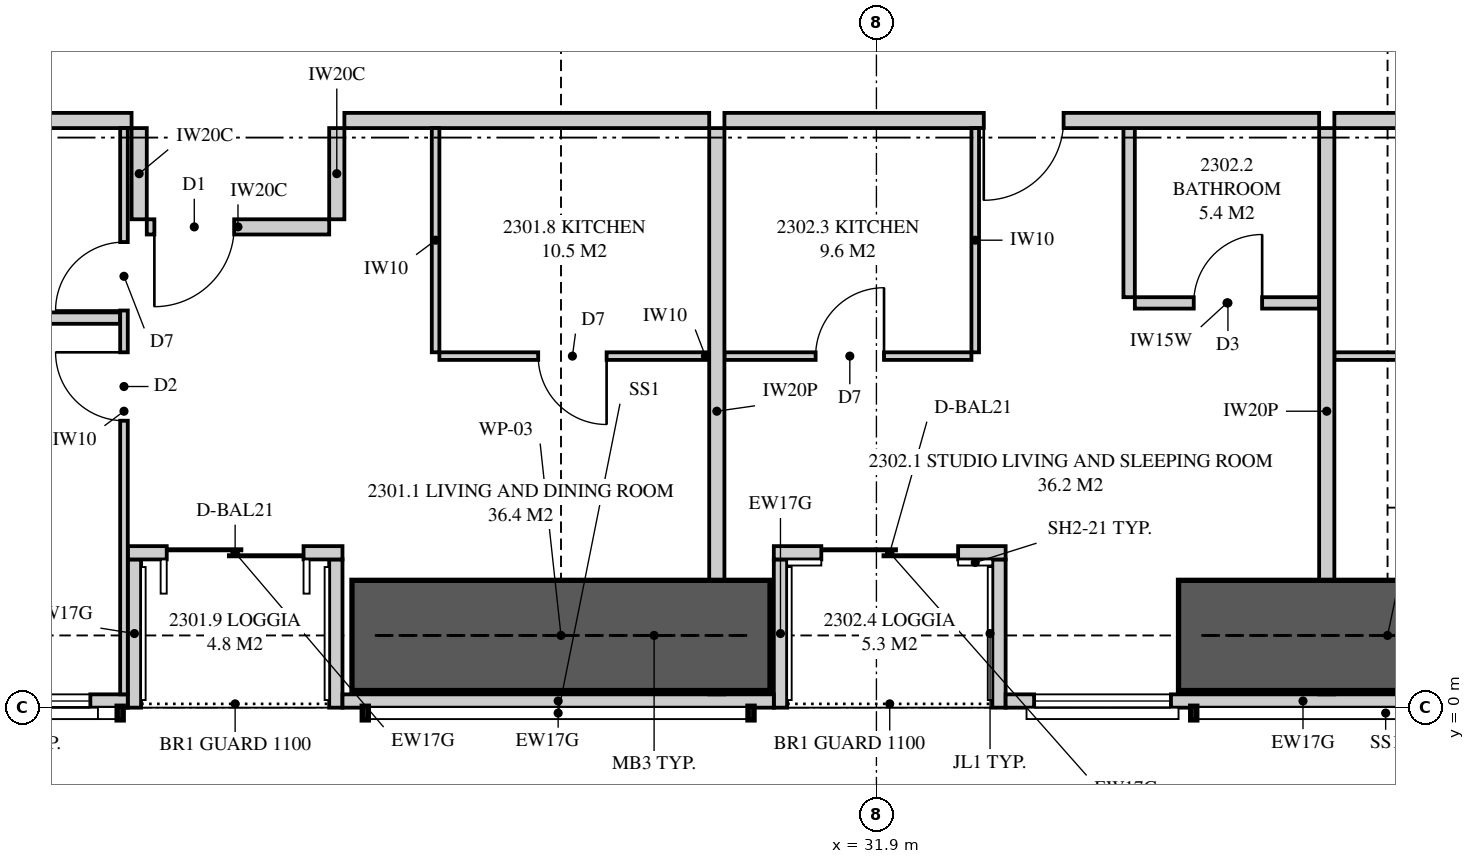
"""IFC4 building model, lengths in metres.
Left out: names, types, materials, properties, quantities, classifications, styles, units other than length and angle.
Written with IfcOpenShell. Run it as: python <this file> out.ifc"""

import sys

from ifc_helpers import new_model, si_unit, direction, frame, frame_2d, origin, place, context, subcontext, project, spatial, polyline, rectangle, outline, extrude, element, fill, save


model = new_model("IFC4")
c1 = context("Model", 3, precision=1e-05, world=origin(), true_north=direction((0.0, 1.0)))
c2 = subcontext(c1, "Body", "Model", "MODEL_VIEW")
j1 = project(units=[si_unit("LENGTHUNIT", "METRE"), si_unit("PLANEANGLEUNIT", "RADIAN")], contexts=[c1])
p1 = place(None, origin())
s1 = spatial("IfcSite", under=j1, at=p1, CompositionType="ELEMENT")
p2 = place(p1, origin())
s2 = spatial("IfcBuilding", under=s1, at=p2, CompositionType="ELEMENT")
p3 = place(p2, frame((0.0, 0.0, 88.1)))
s3 = spatial("IfcBuildingStorey", under=s2, at=p3, CompositionType="ELEMENT", Elevation=88.1)
p4 = place(p3, frame((9.051, 0.087, 0.0), z_axis=(0.0, 0.0, 1.0), x_axis=(1.0, 0.0, 0.0)))
e1 = element("IfcWall", 1, at=p4, inside=s3, PredefinedType="SOLIDWALL", context=c2, shape_type="SweptSolid", body=[
    extrude(outline(polyline([(0.0, 0.0), (12.999, 0.0), (12.999, 2.15), (7.824, 2.15), (7.824, 3.11), (7.666, 3.11), (7.666, 2.15), (7.62, 2.15), (7.62, 3.11), (0.0, 3.11), (0.0, 0.0)])), frame((0.0, 0.087, 0.0), z_axis=(0.0, -1.0, 0.0), x_axis=(1.0, 0.0, 0.0)), (0.0, 0.0, 1.0), 0.175),
])
p5 = place(p4, frame((3.134, 0.0, 0.4)))
e2 = element("IfcOpeningElement", 2, at=p5, cuts=e1, PredefinedType="OPENING", context=c2, shape_type="SweptSolid", body=[
    extrude(rectangle(XDim=1.8, YDim=1.7, at=frame_2d((0.9, 0.85))), frame((0.0, 0.097, 0.0), z_axis=(0.0, -1.0, 0.0), x_axis=(1.0, 0.0, 0.0)), (0.0, 0.0, 1.0), 0.195),
])
p6 = place(p4, frame((10.706, 0.0, 0.4)))
e3 = element("IfcOpeningElement", 3, at=p6, cuts=e1, PredefinedType="OPENING", context=c2, shape_type="SweptSolid", body=[
    extrude(rectangle(XDim=1.8, YDim=1.7, at=frame_2d((0.9, 0.85))), frame((0.0, 0.097, 0.0), z_axis=(0.0, -1.0, 0.0), x_axis=(1.0, 0.0, 0.0)), (0.0, 0.0, 1.0), 0.195),
])
p7 = place(p3, frame((24.875, 0.087, 0.0), z_axis=(0.0, 0.0, 1.0), x_axis=(1.0, 0.0, 0.0)))
e4 = element("IfcWall", 4, at=p7, inside=s3, PredefinedType="SOLIDWALL", context=c2, shape_type="SweptSolid", body=[
    extrude(rectangle(XDim=5.675, YDim=0.175, at=frame_2d((2.837, 0.0))), origin(), (0.0, 0.0, 1.0), 2.15),
])
p8 = place(p3, frame((33.6, 0.087, 0.0), z_axis=(0.0, 0.0, 1.0), x_axis=(1.0, 0.0, 0.0)))
e5 = element("IfcWall", 5, at=p8, inside=s3, PredefinedType="SOLIDWALL", context=c2, shape_type="SweptSolid", body=[
    extrude(outline(polyline([(0.0, 0.0), (7.825, 0.0), (7.825, 3.11), (5.228, 3.11), (5.228, 2.15), (5.183, 2.15), (5.183, 3.11), (5.025, 3.11), (5.025, 2.15), (0.0, 2.15), (0.0, 0.0)])), frame((0.0, 0.087, 0.0), z_axis=(0.0, -1.0, 0.0), x_axis=(1.0, 0.0, 0.0)), (0.0, 0.0, 1.0), 0.175),
])
p9 = place(p8, frame((0.375, 0.0, 0.4)))
e6 = element("IfcOpeningElement", 6, at=p9, cuts=e5, PredefinedType="OPENING", context=c2, shape_type="SweptSolid", body=[
    extrude(rectangle(XDim=1.8, YDim=1.7, at=frame_2d((0.9, 0.85))), frame((0.0, 0.097, 0.0), z_axis=(0.0, -1.0, 0.0), x_axis=(1.0, 0.0, 0.0)), (0.0, 0.0, 1.0), 0.195),
])
p10 = place(p3, frame((22.05, 2.038, 0.0), z_axis=(0.0, 0.0, 1.0), x_axis=(1.0, 0.0, 0.0)))
e7 = element("IfcWall", 7, at=p10, inside=s3, PredefinedType="SOLIDWALL", context=c2, shape_type="SweptSolid", body=[
    extrude(rectangle(XDim=2.825, YDim=0.175, at=frame_2d((1.413, 0.0))), origin(), (0.0, 0.0, 1.0), 3.11),
])
p11 = place(p10, frame((0.512, 0.0, 0.0)))
e8 = element("IfcOpeningElement", 8, at=p11, cuts=e7, PredefinedType="OPENING", context=c2, shape_type="SweptSolid", body=[
    extrude(rectangle(XDim=1.8, YDim=2.1, at=frame_2d((0.9, 1.05))), frame((0.0, 0.097, 0.0), z_axis=(0.0, -1.0, 0.0), x_axis=(1.0, 0.0, 0.0)), (0.0, 0.0, 1.0), 0.195),
])
for number, where, z_axis, x_axis in (
    (9, (22.137, 0.0, 0.0), (0.0, 0.0, 1.0), (0.0, 1.0, 0.0)),
    (10, (24.788, 0.0, 0.0), (0.0, 0.0, 1.0), (0.0, 1.0, 0.0)),
):
    element("IfcWall", number, at=place(p3, frame(where, z_axis=z_axis, x_axis=x_axis)), inside=s3, PredefinedType="SOLIDWALL", context=c2, shape_type="SweptSolid", body=[
        extrude(outline(polyline([(0.0, 0.0), (1.95, 0.0), (1.95, 3.11), (1.75, 3.11), (1.75, 2.15), (0.15, 2.15), (0.15, 3.11), (0.0, 3.11), (0.0, 0.0)])), frame((0.0, 0.087, 0.0), z_axis=(0.0, -1.0, 0.0), x_axis=(1.0, 0.0, 0.0)), (0.0, 0.0, 1.0), 0.175),
    ])
p12 = place(p3, frame((30.55, 2.038, 0.0), z_axis=(0.0, 0.0, 1.0), x_axis=(1.0, 0.0, 0.0)))
e11 = element("IfcWall", 11, at=p12, inside=s3, PredefinedType="SOLIDWALL", context=c2, shape_type="SweptSolid", body=[
    extrude(rectangle(XDim=3.05, YDim=0.175, at=frame_2d((1.525, 0.0))), origin(), (0.0, 0.0, 1.0), 3.11),
])
p13 = place(p12, frame((0.625, 0.0, 0.0)))
e12 = element("IfcOpeningElement", 12, at=p13, cuts=e11, PredefinedType="OPENING", context=c2, shape_type="SweptSolid", body=[
    extrude(rectangle(XDim=1.8, YDim=2.1, at=frame_2d((0.9, 1.05))), frame((0.0, 0.097, 0.0), z_axis=(0.0, -1.0, 0.0), x_axis=(1.0, 0.0, 0.0)), (0.0, 0.0, 1.0), 0.195),
])
for number, where, z_axis, x_axis in (
    (13, (30.637, 0.0, 0.0), (0.0, 0.0, 1.0), (0.0, 1.0, 0.0)),
    (14, (33.512, 0.0, 0.0), (0.0, 0.0, 1.0), (0.0, 1.0, 0.0)),
):
    element("IfcWall", number, at=place(p3, frame(where, z_axis=z_axis, x_axis=x_axis)), inside=s3, PredefinedType="SOLIDWALL", context=c2, shape_type="SweptSolid", body=[
        extrude(outline(polyline([(0.0, 0.0), (1.95, 0.0), (1.95, 3.11), (1.75, 3.11), (1.75, 2.15), (0.15, 2.15), (0.15, 3.11), (0.0, 3.11), (0.0, 0.0)])), frame((0.0, 0.087, 0.0), z_axis=(0.0, -1.0, 0.0), x_axis=(1.0, 0.0, 0.0)), (0.0, 0.0, 1.0), 0.175),
    ])
p14 = place(p3, frame((29.8, 0.175, 0.0), z_axis=(0.0, 0.0, 1.0), x_axis=(0.0, 1.0, 0.0)))
e15 = element("IfcWall", 15, at=p14, inside=s3, PredefinedType="PARTITIONING", context=c2, shape_type="SweptSolid", body=[
    extrude(outline(polyline([(0.526, 2.15), (0.0, 2.15), (0.0, 0.0), (0.526, 0.0), (0.526, 0.115), (1.024, 0.115), (1.024, 0.0), (7.45, 0.0), (7.45, 3.11), (1.685, 3.11), (1.685, 2.15), (1.024, 2.15), (1.024, 2.035), (0.526, 2.035), (0.526, 2.15)])), frame((0.0, 0.1, 0.0), z_axis=(0.0, -1.0, 0.0), x_axis=(1.0, 0.0, 0.0)), (0.0, 0.0, 1.0), 0.2),
])
p15 = place(p3, frame((17.775, 7.725, 0.0), z_axis=(0.0, 0.0, 1.0), x_axis=(1.0, 0.0, 0.0)))
e16 = element("IfcWall", 16, at=p15, inside=s3, PredefinedType="PARTITIONING", context=c2, shape_type="SweptSolid", body=[
    extrude(rectangle(XDim=4.325, YDim=0.2, at=frame_2d((2.163, 0.0))), origin(), (0.0, 0.0, 1.0), 3.11),
])
p16 = place(p3, frame((22.0, 0.175, 0.0), z_axis=(0.0, 0.0, 1.0), x_axis=(0.0, 1.0, 0.0)))
e17 = element("IfcWall", 17, at=p16, inside=s3, PredefinedType="PARTITIONING", context=c2, shape_type="SweptSolid", body=[
    extrude(outline(polyline([(0.0, 0.0), (7.45, 0.0), (7.45, 3.11), (1.635, 3.11), (1.635, 2.15), (0.0, 2.15), (0.0, 3.11), (0.0, 0.0)])), frame((0.0, 0.05, 0.0), z_axis=(0.0, -1.0, 0.0), x_axis=(1.0, 0.0, 0.0)), (0.0, 0.0, 1.0), 0.1),
])
p17 = place(p16, frame((3.6, 0.0, 0.0)))
e18 = element("IfcOpeningElement", 18, at=p17, cuts=e17, PredefinedType="OPENING", context=c2, shape_type="SweptSolid", body=[
    extrude(rectangle(XDim=0.9, YDim=2.1, at=frame_2d((0.45, 1.05))), frame((0.0, 0.06, 0.0), z_axis=(0.0, -1.0, 0.0), x_axis=(1.0, 0.0, 0.0)), (0.0, 0.0, 1.0), 0.12),
])
p18 = place(p16, frame((5.05, 0.0, 0.0)))
e19 = element("IfcOpeningElement", 19, at=p18, cuts=e17, PredefinedType="OPENING", context=c2, shape_type="SweptSolid", body=[
    extrude(rectangle(XDim=0.9, YDim=2.1, at=frame_2d((0.45, 1.05))), frame((0.0, 0.06, 0.0), z_axis=(0.0, -1.0, 0.0), x_axis=(1.0, 0.0, 0.0)), (0.0, 0.0, 1.0), 0.12),
])
p19 = place(p3, frame((17.75, 5.125, 0.0), z_axis=(0.0, 0.0, 1.0), x_axis=(1.0, 0.0, 0.0)))
e20 = element("IfcWall", 20, at=p19, inside=s3, PredefinedType="PLUMBINGWALL", context=c2, shape_type="SweptSolid", body=[
    extrude(rectangle(XDim=4.2, YDim=0.15, at=frame_2d((2.1, 0.0))), origin(), (0.0, 0.0, 1.0), 3.11),
])
p20 = place(p3, frame((26.15, 4.625, 0.0), z_axis=(0.0, 0.0, 1.0), x_axis=(1.0, 0.0, 0.0)))
e21 = element("IfcWall", 21, at=p20, inside=s3, PredefinedType="PARTITIONING", context=c2, shape_type="SweptSolid", body=[
    extrude(outline(polyline([(0.0, 0.0), (3.55, 0.0), (3.55, 3.11), (1.896, 3.11), (1.896, 2.531), (1.304, 2.531), (1.304, 3.11), (0.0, 3.11), (0.0, 0.0)])), frame((0.0, 0.05, 0.0), z_axis=(0.0, -1.0, 0.0), x_axis=(1.0, 0.0, 0.0)), (0.0, 0.0, 1.0), 0.1),
])
p21 = place(p20, frame((1.3, 0.0, 0.0)))
e22 = element("IfcOpeningElement", 22, at=p21, cuts=e21, PredefinedType="OPENING", context=c2, shape_type="SweptSolid", body=[
    extrude(rectangle(XDim=0.9, YDim=2.1, at=frame_2d((0.45, 1.05))), frame((0.0, 0.06, 0.0), z_axis=(0.0, -1.0, 0.0), x_axis=(1.0, 0.0, 0.0)), (0.0, 0.0, 1.0), 0.12),
])
p22 = place(p3, frame((26.1, 4.675, 0.0), z_axis=(0.0, 0.0, 1.0), x_axis=(0.0, 1.0, 0.0)))
e23 = element("IfcWall", 23, at=p22, inside=s3, PredefinedType="PARTITIONING", context=c2, shape_type="SweptSolid", body=[
    extrude(rectangle(XDim=2.95, YDim=0.1, at=frame_2d((1.475, 0.0))), origin(), (0.0, 0.0, 1.0), 3.11),
])
p23 = place(p3, frame((37.825, 0.175, 0.0), z_axis=(0.0, 0.0, 1.0), x_axis=(0.0, 1.0, 0.0)))
e24 = element("IfcWall", 24, at=p23, inside=s3, PredefinedType="PARTITIONING", context=c2, shape_type="SweptSolid", body=[
    extrude(outline(polyline([(0.526, 2.15), (0.0, 2.15), (0.0, 0.0), (0.526, 0.0), (0.526, 0.969), (1.024, 0.969), (1.024, 0.0), (7.45, 0.0), (7.45, 3.11), (1.685, 3.11), (1.685, 2.15), (1.024, 2.15), (1.024, 1.18), (0.526, 1.18), (0.526, 2.15)])), frame((0.0, 0.1, 0.0), z_axis=(0.0, -1.0, 0.0), x_axis=(1.0, 0.0, 0.0)), (0.0, 0.0, 1.0), 0.2),
])
p24 = place(p3, frame((29.9, 7.725, 0.0), z_axis=(0.0, 0.0, 1.0), x_axis=(1.0, 0.0, 0.0)))
e25 = element("IfcWall", 25, at=p24, inside=s3, PredefinedType="PARTITIONING", context=c2, shape_type="SweptSolid", body=[
    extrude(rectangle(XDim=7.825, YDim=0.2, at=frame_2d((3.913, 0.0))), origin(), (0.0, 0.0, 1.0), 3.11),
])
p25 = place(p24, frame((3.413, 0.0, 0.0)))
e26 = element("IfcOpeningElement", 26, at=p25, cuts=e25, PredefinedType="OPENING", context=c2, shape_type="SweptSolid", body=[
    extrude(rectangle(XDim=1.05, YDim=2.2, at=frame_2d((0.525, 1.1))), frame((0.0, 0.11, 0.0), z_axis=(0.0, -1.0, 0.0), x_axis=(1.0, 0.0, 0.0)), (0.0, 0.0, 1.0), 0.22),
])
p26 = place(p3, frame((35.3, 5.325, 0.0), z_axis=(0.0, 0.0, 1.0), x_axis=(1.0, 0.0, 0.0)))
e27 = element("IfcWall", 27, at=p26, inside=s3, PredefinedType="PLUMBINGWALL", context=c2, shape_type="SweptSolid", body=[
    extrude(rectangle(XDim=2.425, YDim=0.15, at=frame_2d((1.212, 0.0))), origin(), (0.0, 0.0, 1.0), 3.11),
])
p27 = place(p26, frame((0.775, 0.0, 0.0)))
e28 = element("IfcOpeningElement", 28, at=p27, cuts=e27, PredefinedType="OPENING", context=c2, shape_type="SweptSolid", body=[
    extrude(rectangle(XDim=0.9, YDim=2.1, at=frame_2d((0.45, 1.05))), frame((0.0, 0.085, 0.0), z_axis=(0.0, -1.0, 0.0), x_axis=(1.0, 0.0, 0.0)), (0.0, 0.0, 1.0), 0.17),
])
p28 = place(p3, frame((35.225, 5.4, 0.0), z_axis=(0.0, 0.0, 1.0), x_axis=(0.0, 1.0, 0.0)))
e29 = element("IfcWall", 29, at=p28, inside=s3, PredefinedType="PLUMBINGWALL", context=c2, shape_type="SweptSolid", body=[
    extrude(rectangle(XDim=2.225, YDim=0.15, at=frame_2d((1.113, 0.0))), origin(), (0.0, 0.0, 1.0), 3.11),
])
p29 = place(p3, frame((29.9, 4.625, 0.0), z_axis=(0.0, 0.0, 1.0), x_axis=(1.0, 0.0, 0.0)))
e30 = element("IfcWall", 30, at=p29, inside=s3, PredefinedType="PARTITIONING", context=c2, shape_type="SweptSolid", body=[
    extrude(rectangle(XDim=3.25, YDim=0.1, at=frame_2d((1.625, 0.0))), origin(), (0.0, 0.0, 1.0), 3.11),
])
p30 = place(p29, frame((1.2, 0.0, 0.0)))
e31 = element("IfcOpeningElement", 31, at=p30, cuts=e30, PredefinedType="OPENING", context=c2, shape_type="SweptSolid", body=[
    extrude(rectangle(XDim=0.9, YDim=2.1, at=frame_2d((0.45, 1.05))), frame((0.0, 0.06, 0.0), z_axis=(0.0, -1.0, 0.0), x_axis=(1.0, 0.0, 0.0)), (0.0, 0.0, 1.0), 0.12),
])
p31 = place(p3, frame((33.2, 4.675, 0.0), z_axis=(0.0, 0.0, 1.0), x_axis=(0.0, 1.0, 0.0)))
e32 = element("IfcWall", 32, at=p31, inside=s3, PredefinedType="PARTITIONING", context=c2, shape_type="SweptSolid", body=[
    extrude(rectangle(XDim=2.95, YDim=0.1, at=frame_2d((1.475, 0.0))), origin(), (0.0, 0.0, 1.0), 3.11),
])
p32 = place(p3, frame((37.925, 7.725, 0.0), z_axis=(0.0, 0.0, 1.0), x_axis=(1.0, 0.0, 0.0)))
e33 = element("IfcWall", 33, at=p32, inside=s3, PredefinedType="PARTITIONING", context=c2, shape_type="SweptSolid", body=[
    extrude(outline(polyline([(0.0, 0.0), (8.1, 0.0), (8.1, 3.11), (1.046, 3.11), (1.046, 2.531), (0.354, 2.531), (0.354, 3.11), (0.0, 3.11), (0.0, 0.0)])), frame((0.0, 0.1, 0.0), z_axis=(0.0, -1.0, 0.0), x_axis=(1.0, 0.0, 0.0)), (0.0, 0.0, 1.0), 0.2),
])
p33 = place(p32, frame((2.4, 0.0, 0.0)))
e34 = element("IfcOpeningElement", 34, at=p33, cuts=e33, PredefinedType="OPENING", context=c2, shape_type="SweptSolid", body=[
    extrude(rectangle(XDim=1.05, YDim=2.2, at=frame_2d((0.525, 1.1))), frame((0.0, 0.11, 0.0), z_axis=(0.0, -1.0, 0.0), x_axis=(1.0, 0.0, 0.0)), (0.0, 0.0, 1.0), 0.22),
])
p34 = place(p3, frame((37.925, 4.625, 0.0), z_axis=(0.0, 0.0, 1.0), x_axis=(1.0, 0.0, 0.0)))
e35 = element("IfcWall", 35, at=p34, inside=s3, PredefinedType="PARTITIONING", context=c2, shape_type="SweptSolid", body=[
    extrude(outline(polyline([(0.0, 0.0), (3.55, 0.0), (3.55, 3.11), (0.996, 3.11), (0.996, 2.531), (0.404, 2.531), (0.404, 3.11), (0.0, 3.11), (0.0, 0.0)])), frame((0.0, 0.05, 0.0), z_axis=(0.0, -1.0, 0.0), x_axis=(1.0, 0.0, 0.0)), (0.0, 0.0, 1.0), 0.1),
])
p35 = place(p34, frame((1.35, 0.0, 0.0)))
e36 = element("IfcOpeningElement", 36, at=p35, cuts=e35, PredefinedType="OPENING", context=c2, shape_type="SweptSolid", body=[
    extrude(rectangle(XDim=0.9, YDim=2.1, at=frame_2d((0.45, 1.05))), frame((0.0, 0.06, 0.0), z_axis=(0.0, -1.0, 0.0), x_axis=(1.0, 0.0, 0.0)), (0.0, 0.0, 1.0), 0.12),
])
p36 = place(p3, frame((24.9, 7.725, 0.0), z_axis=(0.0, 0.0, 1.0), x_axis=(1.0, 0.0, 0.0)))
e37 = element("IfcWall", 37, at=p36, inside=s3, PredefinedType="PARTITIONING", context=c2, shape_type="SweptSolid", body=[
    extrude(outline(polyline([(0.0, 0.0), (4.8, 0.0), (4.8, 3.11), (3.196, 3.11), (3.196, 2.531), (2.504, 2.531), (2.504, 3.11), (0.0, 3.11), (0.0, 0.0)])), frame((0.0, 0.1, 0.0), z_axis=(0.0, -1.0, 0.0), x_axis=(1.0, 0.0, 0.0)), (0.0, 0.0, 1.0), 0.2),
])
p37 = place(p3, frame((22.3, 6.325, 0.0), z_axis=(0.0, 0.0, 1.0), x_axis=(1.0, 0.0, 0.0)))
e38 = element("IfcWall", 38, at=p37, inside=s3, PredefinedType="PARTITIONING", context=c2, shape_type="SweptSolid", body=[
    extrude(rectangle(XDim=2.4, YDim=0.2, at=frame_2d((1.2, 0.0))), origin(), (0.0, 0.0, 1.0), 3.11),
])
p38 = place(p37, frame((0.1, 0.0, 0.0)))
e39 = element("IfcOpeningElement", 39, at=p38, cuts=e38, PredefinedType="OPENING", context=c2, shape_type="SweptSolid", body=[
    extrude(rectangle(XDim=1.05, YDim=2.2, at=frame_2d((0.525, 1.1))), frame((0.0, 0.11, 0.0), z_axis=(0.0, -1.0, 0.0), x_axis=(1.0, 0.0, 0.0)), (0.0, 0.0, 1.0), 0.22),
])
for number, where, z_axis, x_axis in (
    (40, (22.2, 7.625, 0.0), (0.0, 0.0, 1.0), (0.0, -1.0, 0.0)),
    (41, (24.8, 7.625, 0.0), (0.0, 0.0, 1.0), (0.0, -1.0, 0.0)),
):
    element("IfcWall", number, at=place(p3, frame(where, z_axis=z_axis, x_axis=x_axis)), inside=s3, PredefinedType="PARTITIONING", context=c2, shape_type="SweptSolid", body=[
        extrude(rectangle(XDim=1.2, YDim=0.2, at=frame_2d((0.6, 0.0))), origin(), (0.0, 0.0, 1.0), 3.11),
    ])
for number, where, z_axis, x_axis in (
    (42, (25.0, 0.95, 0.0), (0.0, 0.0, 1.0), (1.0, 0.0, 0.0)),
    (43, (35.875, 0.95, 0.0), (0.0, 0.0, 1.0), (1.0, 0.0, 0.0)),
):
    element("IfcWall", number, at=place(p3, frame(where, z_axis=z_axis, x_axis=x_axis)), inside=s3, PredefinedType="SHEAR", context=c2, shape_type="SweptSolid", body=[
        extrude(rectangle(XDim=5.5, YDim=1.45, at=frame_2d((2.75, 0.0))), origin(), (0.0, 0.0, 1.0), 3.35),
    ])
p39 = place(p6, origin())
e44 = element("IfcWindow", 44, at=p39, inside=s3, PartitioningType="SINGLE_PANEL", PredefinedType="WINDOW", context=c2, shape_type="SweptSolid", body=[
    extrude(rectangle(XDim=1.8, YDim=1.7, at=frame_2d((0.9, 0.85))), frame((0.0, 0.03, 0.0), z_axis=(0.0, -1.0, 0.0), x_axis=(1.0, 0.0, 0.0)), (0.0, 0.0, 1.0), 0.06),
])
fill(e3, e44)
p40 = place(p11, origin())
e45 = element("IfcDoor", 45, at=p40, inside=s3, OperationType="SLIDING_TO_LEFT", PredefinedType="DOOR", context=c2, shape_type="SweptSolid", body=[
    extrude(rectangle(XDim=1.8, YDim=2.1, at=frame_2d((0.9, 1.05))), frame((0.0, 0.025, 0.0), z_axis=(0.0, -1.0, 0.0), x_axis=(1.0, 0.0, 0.0)), (0.0, 0.0, 1.0), 0.05),
])
fill(e8, e45)
p41 = place(p13, origin())
e46 = element("IfcDoor", 46, at=p41, inside=s3, OperationType="SLIDING_TO_LEFT", PredefinedType="DOOR", context=c2, shape_type="SweptSolid", body=[
    extrude(rectangle(XDim=1.8, YDim=2.1, at=frame_2d((0.9, 1.05))), frame((0.0, 0.025, 0.0), z_axis=(0.0, -1.0, 0.0), x_axis=(1.0, 0.0, 0.0)), (0.0, 0.0, 1.0), 0.05),
])
fill(e12, e46)
p42 = place(p9, origin())
e47 = element("IfcWindow", 47, at=p42, inside=s3, PartitioningType="SINGLE_PANEL", PredefinedType="WINDOW", context=c2, shape_type="SweptSolid", body=[
    extrude(rectangle(XDim=1.8, YDim=1.7, at=frame_2d((0.9, 0.85))), frame((0.0, 0.03, 0.0), z_axis=(0.0, -1.0, 0.0), x_axis=(1.0, 0.0, 0.0)), (0.0, 0.0, 1.0), 0.06),
])
fill(e6, e47)
p43 = place(p38, frame((1.05, 0.0, 0.0), z_axis=(0.0, 0.0, 1.0), x_axis=(-1.0, 0.0, 0.0)))
e48 = element("IfcDoor", 48, at=p43, inside=s3, OperationType="SINGLE_SWING_RIGHT", PredefinedType="DOOR", context=c2, shape_type="SweptSolid", body=[
    extrude(rectangle(XDim=1.05, YDim=2.2, at=frame_2d((0.525, 1.1))), frame((0.0, 0.025, 0.0), z_axis=(0.0, -1.0, 0.0), x_axis=(1.0, 0.0, 0.0)), (0.0, 0.0, 1.0), 0.05),
])
fill(e39, e48)
p44 = place(p17, origin())
e49 = element("IfcDoor", 49, at=p44, inside=s3, OperationType="SINGLE_SWING_RIGHT", PredefinedType="DOOR", context=c2, shape_type="SweptSolid", body=[
    extrude(rectangle(XDim=0.9, YDim=2.1, at=frame_2d((0.45, 1.05))), frame((0.0, 0.025, 0.0), z_axis=(0.0, -1.0, 0.0), x_axis=(1.0, 0.0, 0.0)), (0.0, 0.0, 1.0), 0.05),
])
fill(e18, e49)
p45 = place(p18, origin())
e50 = element("IfcDoor", 50, at=p45, inside=s3, OperationType="SINGLE_SWING_LEFT", PredefinedType="DOOR", context=c2, shape_type="SweptSolid", body=[
    extrude(rectangle(XDim=0.9, YDim=2.1, at=frame_2d((0.45, 1.05))), frame((0.0, 0.025, 0.0), z_axis=(0.0, -1.0, 0.0), x_axis=(1.0, 0.0, 0.0)), (0.0, 0.0, 1.0), 0.05),
])
fill(e19, e50)
p46 = place(p21, frame((0.9, 0.0, 0.0), z_axis=(0.0, 0.0, 1.0), x_axis=(-1.0, 0.0, 0.0)))
e51 = element("IfcDoor", 51, at=p46, inside=s3, OperationType="SINGLE_SWING_LEFT", PredefinedType="DOOR", context=c2, shape_type="SweptSolid", body=[
    extrude(rectangle(XDim=0.9, YDim=2.1, at=frame_2d((0.45, 1.05))), frame((0.0, 0.025, 0.0), z_axis=(0.0, -1.0, 0.0), x_axis=(1.0, 0.0, 0.0)), (0.0, 0.0, 1.0), 0.05),
])
fill(e22, e51)
p47 = place(p25, frame((1.05, 0.0, 0.0), z_axis=(0.0, 0.0, 1.0), x_axis=(-1.0, 0.0, 0.0)))
e52 = element("IfcDoor", 52, at=p47, inside=s3, OperationType="SINGLE_SWING_RIGHT", PredefinedType="DOOR", context=c2, shape_type="SweptSolid", body=[
    extrude(rectangle(XDim=1.05, YDim=2.2, at=frame_2d((0.525, 1.1))), frame((0.0, 0.025, 0.0), z_axis=(0.0, -1.0, 0.0), x_axis=(1.0, 0.0, 0.0)), (0.0, 0.0, 1.0), 0.05),
])
fill(e26, e52)
p48 = place(p27, origin())
e53 = element("IfcDoor", 53, at=p48, inside=s3, OperationType="SINGLE_SWING_RIGHT", PredefinedType="DOOR", context=c2, shape_type="SweptSolid", body=[
    extrude(rectangle(XDim=0.9, YDim=2.1, at=frame_2d((0.45, 1.05))), frame((0.0, 0.025, 0.0), z_axis=(0.0, -1.0, 0.0), x_axis=(1.0, 0.0, 0.0)), (0.0, 0.0, 1.0), 0.05),
])
fill(e28, e53)
p49 = place(p30, origin())
e54 = element("IfcDoor", 54, at=p49, inside=s3, OperationType="SINGLE_SWING_RIGHT", PredefinedType="DOOR", context=c2, shape_type="SweptSolid", body=[
    extrude(rectangle(XDim=0.9, YDim=2.1, at=frame_2d((0.45, 1.05))), frame((0.0, 0.025, 0.0), z_axis=(0.0, -1.0, 0.0), x_axis=(1.0, 0.0, 0.0)), (0.0, 0.0, 1.0), 0.05),
])
fill(e31, e54)
save(model, sys.argv[1])
